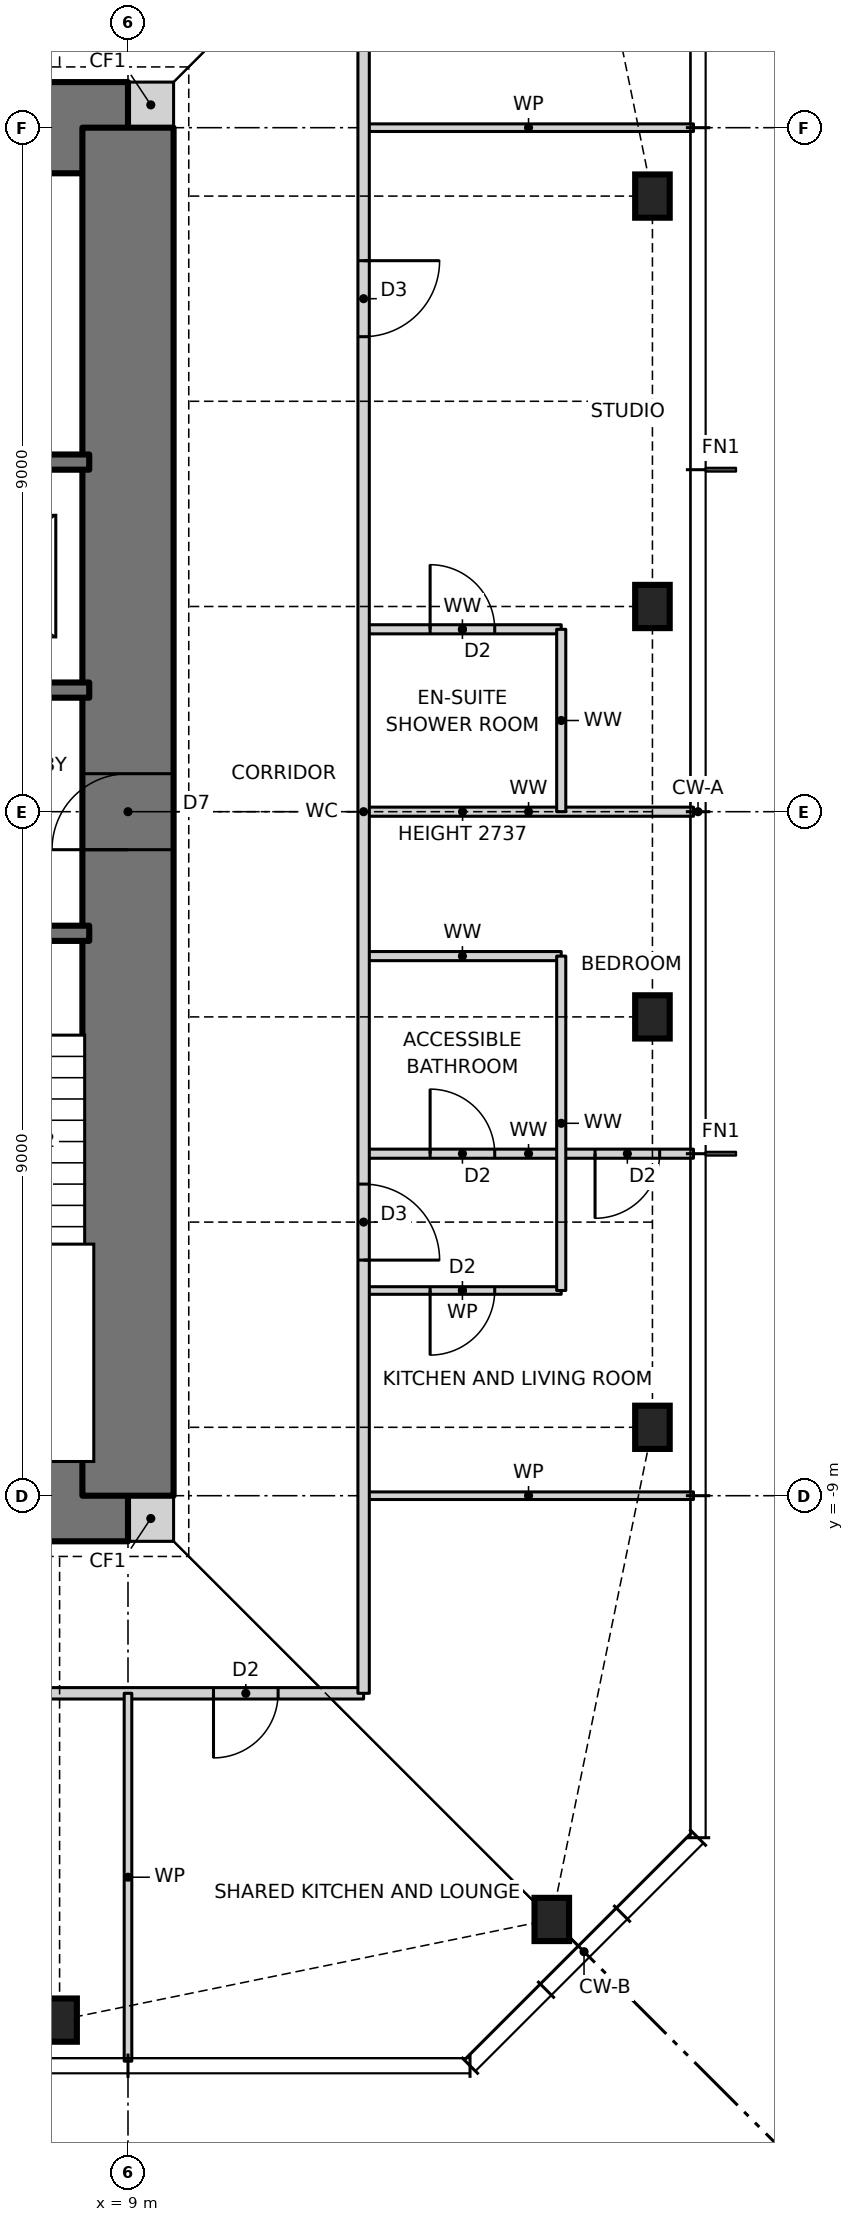
"""IFC4 building model, lengths in metres.
Left out: names, types, materials, properties, quantities, classifications, styles, units other than length and angle.
Written with IfcOpenShell. Run it as: python <this file> out.ifc"""

import sys

from ifc_helpers import new_model, si_unit, direction, frame, frame_2d, origin, origin_2d, place, context, subcontext, project, spatial, rectangle, i_section, extrude, element, fill, save


model = new_model("IFC4")
c1 = context("Model", 3, precision=1e-05, world=origin(), true_north=direction((0.0, 1.0)))
c2 = subcontext(c1, "Body", "Model", "MODEL_VIEW")
j1 = project(units=[si_unit("LENGTHUNIT", "METRE"), si_unit("PLANEANGLEUNIT", "RADIAN")], contexts=[c1])
p1 = place(None, origin())
s1 = spatial("IfcSite", under=j1, at=p1, CompositionType="ELEMENT")
p2 = place(p1, origin())
s2 = spatial("IfcBuilding", under=s1, at=p2, CompositionType="ELEMENT")
p3 = place(p2, frame((0.0, 0.0, 253.5)))
s3 = spatial("IfcBuildingStorey", under=s2, at=p3, CompositionType="ELEMENT", Elevation=253.5)
for number, where, z_axis, x_axis in (
    (1, (8.1, -15.9, 0.0), (0.0, 0.0, 1.0), (1.0, 0.0, 0.0)),
    (2, (14.576, -14.576, 0.0), (0.0, 0.0, 1.0), (1.0, 0.0, 0.0)),
    (3, (15.9, -8.1, 0.0), (0.0, 0.0, 1.0), (1.0, 0.0, 0.0)),
    (4, (15.9, -2.7, 0.0), (0.0, 0.0, 1.0), (1.0, 0.0, 0.0)),
    (5, (15.9, 2.7, 0.0), (0.0, 0.0, 1.0), (1.0, 0.0, 0.0)),
    (6, (15.9, 8.1, 0.0), (0.0, 0.0, 1.0), (1.0, 0.0, 0.0)),
):
    element("IfcColumn", number, at=place(p3, frame(where, z_axis=z_axis, x_axis=x_axis)), inside=s3, PredefinedType="COLUMN", context=c2, shape_type="SweptSolid", body=[
        extrude(i_section(OverallWidth=0.455, OverallDepth=0.569, WebThickness=0.078, FlangeThickness=0.125, at=origin_2d()), origin(), (0.0, 0.0, 1.0), 3.5),
    ])
for number, where, z_axis, x_axis in (
    (7, (9.0, -9.3, 0.0), (0.0, 0.0, 1.0), (1.0, 0.0, 0.0)),
    (8, (9.0, 9.3, 0.0), (0.0, 0.0, 1.0), (1.0, 0.0, 0.0)),
):
    element("IfcWall", number, at=place(p3, frame(where, z_axis=z_axis, x_axis=x_axis)), inside=s3, PredefinedType="SOLIDWALL", context=c2, shape_type="SweptSolid", body=[
        extrude(rectangle(XDim=0.6, YDim=0.6, at=frame_2d((0.3, 0.0))), origin(), (0.0, 0.0, 1.0), 3.5),
    ])
p4 = place(p3, frame((-9.0, -9.0, 0.0), z_axis=(0.0, 0.0, 1.0), x_axis=(1.0, 0.0, 0.0)))
e9 = element("IfcWall", 9, at=p4, inside=s3, PredefinedType="SHEAR", context=c2, shape_type="SweptSolid", body=[
    extrude(rectangle(XDim=18.0, YDim=1.2, at=frame_2d((9.0, 0.0))), origin(), (0.0, 0.0, 1.0), 3.5),
])
p5 = place(p4, frame((3.775, 0.0, 0.0)))
e10 = element("IfcOpeningElement", 10, at=p5, cuts=e9, PredefinedType="OPENING", context=c2, shape_type="SweptSolid", body=[
    extrude(rectangle(XDim=0.9, YDim=2.1, at=frame_2d((0.45, 1.05))), frame((0.0, 0.61, 0.0), z_axis=(0.0, -1.0, 0.0), x_axis=(1.0, 0.0, 0.0)), (0.0, 0.0, 1.0), 1.22),
])
p6 = place(p4, frame((10.625, 0.0, 0.0)))
e11 = element("IfcOpeningElement", 11, at=p6, cuts=e9, PredefinedType="OPENING", context=c2, shape_type="SweptSolid", body=[
    extrude(rectangle(XDim=0.9, YDim=2.1, at=frame_2d((0.45, 1.05))), frame((0.0, 0.61, 0.0), z_axis=(0.0, -1.0, 0.0), x_axis=(1.0, 0.0, 0.0)), (0.0, 0.0, 1.0), 1.22),
])
p7 = place(p3, frame((9.0, 9.0, 0.0), z_axis=(0.0, 0.0, 1.0), x_axis=(-1.0, 0.0, 0.0)))
e12 = element("IfcWall", 12, at=p7, inside=s3, PredefinedType="SHEAR", context=c2, shape_type="SweptSolid", body=[
    extrude(rectangle(XDim=18.0, YDim=1.2, at=frame_2d((9.0, 0.0))), origin(), (0.0, 0.0, 1.0), 3.5),
])
p8 = place(p7, frame((11.125, 0.0, 0.0)))
e13 = element("IfcOpeningElement", 13, at=p8, cuts=e12, PredefinedType="OPENING", context=c2, shape_type="SweptSolid", body=[
    extrude(rectangle(XDim=0.9, YDim=2.1, at=frame_2d((0.45, 1.05))), frame((0.0, 0.61, 0.0), z_axis=(0.0, -1.0, 0.0), x_axis=(1.0, 0.0, 0.0)), (0.0, 0.0, 1.0), 1.22),
])
p9 = place(p7, frame((4.275, 0.0, 0.0)))
e14 = element("IfcOpeningElement", 14, at=p9, cuts=e12, PredefinedType="OPENING", context=c2, shape_type="SweptSolid", body=[
    extrude(rectangle(XDim=0.9, YDim=2.1, at=frame_2d((0.45, 1.05))), frame((0.0, 0.61, 0.0), z_axis=(0.0, -1.0, 0.0), x_axis=(1.0, 0.0, 0.0)), (0.0, 0.0, 1.0), 1.22),
])
p10 = place(p3, frame((9.0, -9.0, 0.0), z_axis=(0.0, 0.0, 1.0), x_axis=(0.0, 1.0, 0.0)))
e15 = element("IfcWall", 15, at=p10, inside=s3, PredefinedType="SHEAR", context=c2, shape_type="SweptSolid", body=[
    extrude(rectangle(XDim=18.0, YDim=1.2, at=frame_2d((9.0, 0.0))), origin(), (0.0, 0.0, 1.0), 3.5),
])
p11 = place(p10, frame((8.5, 0.0, 0.0)))
e16 = element("IfcOpeningElement", 16, at=p11, cuts=e15, PredefinedType="OPENING", context=c2, shape_type="SweptSolid", body=[
    extrude(rectangle(XDim=1.0, YDim=2.1, at=frame_2d((0.5, 1.05))), frame((0.0, 0.61, 0.0), z_axis=(0.0, -1.0, 0.0), x_axis=(1.0, 0.0, 0.0)), (0.0, 0.0, 1.0), 1.22),
])
p12 = place(p3, frame((-11.6, -11.6, 0.0), z_axis=(0.0, 0.0, 1.0), x_axis=(1.0, 0.0, 0.0)))
e17 = element("IfcWall", 17, at=p12, inside=s3, PredefinedType="PARTITIONING", context=c2, shape_type="SweptSolid", body=[
    extrude(rectangle(XDim=23.7, YDim=0.15, at=frame_2d((11.85, 0.0))), origin(), (0.0, 0.0, 1.0), 3.27),
])
p13 = place(p12, frame((4.35, 0.0, 0.0)))
e18 = element("IfcOpeningElement", 18, at=p13, cuts=e17, PredefinedType="OPENING", context=c2, shape_type="SweptSolid", body=[
    extrude(rectangle(XDim=1.0, YDim=2.1, at=frame_2d((0.5, 1.05))), frame((0.0, 0.085, 0.0), z_axis=(0.0, -1.0, 0.0), x_axis=(1.0, 0.0, 0.0)), (0.0, 0.0, 1.0), 0.17),
])
p14 = place(p12, frame((17.85, 0.0, 0.0)))
e19 = element("IfcOpeningElement", 19, at=p14, cuts=e17, PredefinedType="OPENING", context=c2, shape_type="SweptSolid", body=[
    extrude(rectangle(XDim=1.0, YDim=2.1, at=frame_2d((0.5, 1.05))), frame((0.0, 0.085, 0.0), z_axis=(0.0, -1.0, 0.0), x_axis=(1.0, 0.0, 0.0)), (0.0, 0.0, 1.0), 0.17),
])
p15 = place(p12, frame((21.725, 0.0, 0.0)))
e20 = element("IfcOpeningElement", 20, at=p15, cuts=e17, PredefinedType="OPENING", context=c2, shape_type="SweptSolid", body=[
    extrude(rectangle(XDim=0.85, YDim=2.1, at=frame_2d((0.425, 1.05))), frame((0.0, 0.085, 0.0), z_axis=(0.0, -1.0, 0.0), x_axis=(1.0, 0.0, 0.0)), (0.0, 0.0, 1.0), 0.17),
])
p16 = place(p3, frame((12.1, -9.0, 0.0), z_axis=(0.0, 0.0, 1.0), x_axis=(1.0, 0.0, 0.0)))
e21 = element("IfcWall", 21, at=p16, inside=s3, PredefinedType="PARTITIONING", context=c2, shape_type="SweptSolid", body=[
    extrude(rectangle(XDim=4.34, YDim=0.1, at=frame_2d((2.17, 0.0))), origin(), (0.0, 0.0, 1.0), 3.27),
])
p17 = place(p3, frame((12.1, -6.3, 0.0), z_axis=(0.0, 0.0, 1.0), x_axis=(1.0, 0.0, 0.0)))
e22 = element("IfcWall", 22, at=p17, inside=s3, PredefinedType="PARTITIONING", context=c2, shape_type="SweptSolid", body=[
    extrude(rectangle(XDim=2.6, YDim=0.1, at=frame_2d((1.3, 0.0))), origin(), (0.0, 0.0, 1.0), 3.27),
])
p18 = place(p17, frame((0.875, 0.0, 0.0)))
e23 = element("IfcOpeningElement", 23, at=p18, cuts=e22, PredefinedType="OPENING", context=c2, shape_type="SweptSolid", body=[
    extrude(rectangle(XDim=0.85, YDim=2.1, at=frame_2d((0.425, 1.05))), frame((0.0, 0.06, 0.0), z_axis=(0.0, -1.0, 0.0), x_axis=(1.0, 0.0, 0.0)), (0.0, 0.0, 1.0), 0.12),
])
p19 = place(p3, frame((12.1, -4.5, 0.0), z_axis=(0.0, 0.0, 1.0), x_axis=(1.0, 0.0, 0.0)))
e24 = element("IfcWall", 24, at=p19, inside=s3, PredefinedType="PARTITIONING", context=c2, shape_type="SweptSolid", body=[
    extrude(rectangle(XDim=4.34, YDim=0.12, at=frame_2d((2.17, 0.0))), origin(), (0.0, 0.0, 1.0), 3.27),
])
p20 = place(p19, frame((3.045, 0.0, 0.0)))
e25 = element("IfcOpeningElement", 25, at=p20, cuts=e24, PredefinedType="OPENING", context=c2, shape_type="SweptSolid", body=[
    extrude(rectangle(XDim=0.85, YDim=2.1, at=frame_2d((0.425, 1.05))), frame((0.0, 0.07, 0.0), z_axis=(0.0, -1.0, 0.0), x_axis=(1.0, 0.0, 0.0)), (0.0, 0.0, 1.0), 0.14),
])
p21 = place(p19, frame((0.875, 0.0, 0.0)))
e26 = element("IfcOpeningElement", 26, at=p21, cuts=e24, PredefinedType="OPENING", context=c2, shape_type="SweptSolid", body=[
    extrude(rectangle(XDim=0.85, YDim=2.1, at=frame_2d((0.425, 1.05))), frame((0.0, 0.07, 0.0), z_axis=(0.0, -1.0, 0.0), x_axis=(1.0, 0.0, 0.0)), (0.0, 0.0, 1.0), 0.14),
])
p22 = place(p3, frame((12.1, -1.9, 0.0), z_axis=(0.0, 0.0, 1.0), x_axis=(1.0, 0.0, 0.0)))
e27 = element("IfcWall", 27, at=p22, inside=s3, PredefinedType="PARTITIONING", context=c2, shape_type="SweptSolid", body=[
    extrude(rectangle(XDim=2.6, YDim=0.12, at=frame_2d((1.3, 0.0))), origin(), (0.0, 0.0, 1.0), 3.27),
])
p23 = place(p3, frame((-8.49, -1.6, 0.0), z_axis=(0.0, 0.0, 1.0), x_axis=(1.0, 0.0, 0.0)))
e28 = element("IfcWall", 28, at=p23, inside=s3, PredefinedType="SOLIDWALL", context=c2, shape_type="SweptSolid", body=[
    extrude(rectangle(XDim=16.98, YDim=0.2, at=frame_2d((8.49, 0.0))), origin(), (0.0, 0.0, 1.0), 3.5),
])
p24 = place(p23, frame((14.81, 0.0, 0.0)))
e29 = element("IfcOpeningElement", 29, at=p24, cuts=e28, PredefinedType="OPENING", context=c2, shape_type="SweptSolid", body=[
    extrude(rectangle(XDim=1.0, YDim=2.1, at=frame_2d((0.5, 1.05))), frame((0.0, 0.11, 0.0), z_axis=(0.0, -1.0, 0.0), x_axis=(1.0, 0.0, 0.0)), (0.0, 0.0, 1.0), 0.22),
])
p25 = place(p23, frame((1.232, 0.0, 0.0)))
e30 = element("IfcOpeningElement", 30, at=p25, cuts=e28, PredefinedType="OPENING", context=c2, shape_type="SweptSolid", body=[
    extrude(rectangle(XDim=0.9, YDim=2.1, at=frame_2d((0.45, 1.05))), frame((0.0, 0.11, 0.0), z_axis=(0.0, -1.0, 0.0), x_axis=(1.0, 0.0, 0.0)), (0.0, 0.0, 1.0), 0.22),
])
p26 = place(p23, frame((4.627, 0.0, 0.0)))
e31 = element("IfcOpeningElement", 31, at=p26, cuts=e28, PredefinedType="OPENING", context=c2, shape_type="SweptSolid", body=[
    extrude(rectangle(XDim=0.9, YDim=2.1, at=frame_2d((0.45, 1.05))), frame((0.0, 0.11, 0.0), z_axis=(0.0, -1.0, 0.0), x_axis=(1.0, 0.0, 0.0)), (0.0, 0.0, 1.0), 0.22),
])
p27 = place(p23, frame((8.052, 0.0, 0.0)))
e32 = element("IfcOpeningElement", 32, at=p27, cuts=e28, PredefinedType="OPENING", context=c2, shape_type="SweptSolid", body=[
    extrude(rectangle(XDim=0.9, YDim=2.1, at=frame_2d((0.45, 1.05))), frame((0.0, 0.11, 0.0), z_axis=(0.0, -1.0, 0.0), x_axis=(1.0, 0.0, 0.0)), (0.0, 0.0, 1.0), 0.22),
])
p28 = place(p23, frame((11.478, 0.0, 0.0)))
e33 = element("IfcOpeningElement", 33, at=p28, cuts=e28, PredefinedType="OPENING", context=c2, shape_type="SweptSolid", body=[
    extrude(rectangle(XDim=0.9, YDim=2.1, at=frame_2d((0.45, 1.05))), frame((0.0, 0.11, 0.0), z_axis=(0.0, -1.0, 0.0), x_axis=(1.0, 0.0, 0.0)), (0.0, 0.0, 1.0), 0.22),
])
p29 = place(p3, frame((12.1, 0.0, 0.0), z_axis=(0.0, 0.0, 1.0), x_axis=(1.0, 0.0, 0.0)))
e34 = element("IfcWall", 34, at=p29, inside=s3, PredefinedType="PARTITIONING", context=c2, shape_type="SweptSolid", body=[
    extrude(rectangle(XDim=4.34, YDim=0.12, at=frame_2d((2.17, 0.0))), origin(), (0.0, 0.0, 1.0), 2.737),
])
p30 = place(p3, frame((-8.49, 1.6, 0.0), z_axis=(0.0, 0.0, 1.0), x_axis=(1.0, 0.0, 0.0)))
e35 = element("IfcWall", 35, at=p30, inside=s3, PredefinedType="SOLIDWALL", context=c2, shape_type="SweptSolid", body=[
    extrude(rectangle(XDim=16.98, YDim=0.2, at=frame_2d((8.49, 0.0))), origin(), (0.0, 0.0, 1.0), 3.5),
])
p31 = place(p30, frame((1.17, 0.0, 0.0)))
e36 = element("IfcOpeningElement", 36, at=p31, cuts=e35, PredefinedType="OPENING", context=c2, shape_type="SweptSolid", body=[
    extrude(rectangle(XDim=1.0, YDim=2.1, at=frame_2d((0.5, 1.05))), frame((0.0, 0.11, 0.0), z_axis=(0.0, -1.0, 0.0), x_axis=(1.0, 0.0, 0.0)), (0.0, 0.0, 1.0), 0.22),
])
p32 = place(p30, frame((4.606, 0.0, 0.0)))
e37 = element("IfcOpeningElement", 37, at=p32, cuts=e35, PredefinedType="OPENING", context=c2, shape_type="SweptSolid", body=[
    extrude(rectangle(XDim=0.9, YDim=2.1, at=frame_2d((0.45, 1.05))), frame((0.0, 0.11, 0.0), z_axis=(0.0, -1.0, 0.0), x_axis=(1.0, 0.0, 0.0)), (0.0, 0.0, 1.0), 0.22),
])
p33 = place(p30, frame((8.04, 0.0, 0.0)))
e38 = element("IfcOpeningElement", 38, at=p33, cuts=e35, PredefinedType="OPENING", context=c2, shape_type="SweptSolid", body=[
    extrude(rectangle(XDim=0.9, YDim=2.1, at=frame_2d((0.45, 1.05))), frame((0.0, 0.11, 0.0), z_axis=(0.0, -1.0, 0.0), x_axis=(1.0, 0.0, 0.0)), (0.0, 0.0, 1.0), 0.22),
])
p34 = place(p30, frame((11.374, 0.0, 0.0)))
e39 = element("IfcOpeningElement", 39, at=p34, cuts=e35, PredefinedType="OPENING", context=c2, shape_type="SweptSolid", body=[
    extrude(rectangle(XDim=1.1, YDim=2.1, at=frame_2d((0.55, 1.05))), frame((0.0, 0.11, 0.0), z_axis=(0.0, -1.0, 0.0), x_axis=(1.0, 0.0, 0.0)), (0.0, 0.0, 1.0), 0.22),
])
p35 = place(p30, frame((14.66, 0.0, 0.0)))
e40 = element("IfcOpeningElement", 40, at=p35, cuts=e35, PredefinedType="OPENING", context=c2, shape_type="SweptSolid", body=[
    extrude(rectangle(XDim=1.3, YDim=2.1, at=frame_2d((0.65, 1.05))), frame((0.0, 0.11, 0.0), z_axis=(0.0, -1.0, 0.0), x_axis=(1.0, 0.0, 0.0)), (0.0, 0.0, 1.0), 0.22),
])
p36 = place(p3, frame((12.1, 2.4, 0.0), z_axis=(0.0, 0.0, 1.0), x_axis=(1.0, 0.0, 0.0)))
e41 = element("IfcWall", 41, at=p36, inside=s3, PredefinedType="PARTITIONING", context=c2, shape_type="SweptSolid", body=[
    extrude(rectangle(XDim=2.6, YDim=0.12, at=frame_2d((1.3, 0.0))), origin(), (0.0, 0.0, 1.0), 3.27),
])
p37 = place(p36, frame((0.875, 0.0, 0.0)))
e42 = element("IfcOpeningElement", 42, at=p37, cuts=e41, PredefinedType="OPENING", context=c2, shape_type="SweptSolid", body=[
    extrude(rectangle(XDim=0.85, YDim=2.1, at=frame_2d((0.425, 1.05))), frame((0.0, 0.07, 0.0), z_axis=(0.0, -1.0, 0.0), x_axis=(1.0, 0.0, 0.0)), (0.0, 0.0, 1.0), 0.14),
])
p38 = place(p3, frame((5.15, 4.6, 0.0), z_axis=(0.0, 0.0, 1.0), x_axis=(1.0, 0.0, 0.0)))
e43 = element("IfcWall", 43, at=p38, inside=s3, PredefinedType="SOLIDWALL", context=c2, shape_type="SweptSolid", body=[
    extrude(rectangle(XDim=3.34, YDim=0.2, at=frame_2d((1.67, 0.0))), origin(), (0.0, 0.0, 1.0), 3.5),
])
p39 = place(p3, frame((12.1, 9.0, 0.0), z_axis=(0.0, 0.0, 1.0), x_axis=(1.0, 0.0, 0.0)))
e44 = element("IfcWall", 44, at=p39, inside=s3, PredefinedType="PARTITIONING", context=c2, shape_type="SweptSolid", body=[
    extrude(rectangle(XDim=4.34, YDim=0.1, at=frame_2d((2.17, 0.0))), origin(), (0.0, 0.0, 1.0), 3.27),
])
p40 = place(p3, frame((14.7, -6.3, 0.0), z_axis=(0.0, 0.0, 1.0), x_axis=(0.0, 1.0, 0.0)))
e45 = element("IfcWall", 45, at=p40, inside=s3, PredefinedType="PARTITIONING", context=c2, shape_type="SweptSolid", body=[
    extrude(rectangle(XDim=4.4, YDim=0.12, at=frame_2d((2.2, 0.0))), origin(), (0.0, 0.0, 1.0), 3.27),
])
p41 = place(p3, frame((14.7, 0.0, 0.0), z_axis=(0.0, 0.0, 1.0), x_axis=(0.0, 1.0, 0.0)))
e46 = element("IfcWall", 46, at=p41, inside=s3, PredefinedType="PARTITIONING", context=c2, shape_type="SweptSolid", body=[
    extrude(rectangle(XDim=2.4, YDim=0.12, at=frame_2d((1.2, 0.0))), origin(), (0.0, 0.0, 1.0), 3.27),
])
p42 = place(p3, frame((12.1, -11.6, 0.0), z_axis=(0.0, 0.0, 1.0), x_axis=(0.0, 1.0, 0.0)))
e47 = element("IfcWall", 47, at=p42, inside=s3, PredefinedType="PARTITIONING", context=c2, shape_type="SweptSolid", body=[
    extrude(rectangle(XDim=23.2, YDim=0.15, at=frame_2d((11.6, 0.0))), origin(), (0.0, 0.0, 1.0), 3.27),
])
p43 = place(p42, frame((5.7, 0.0, 0.0)))
e48 = element("IfcOpeningElement", 48, at=p43, cuts=e47, PredefinedType="OPENING", context=c2, shape_type="SweptSolid", body=[
    extrude(rectangle(XDim=1.0, YDim=2.1, at=frame_2d((0.5, 1.05))), frame((0.0, 0.085, 0.0), z_axis=(0.0, -1.0, 0.0), x_axis=(1.0, 0.0, 0.0)), (0.0, 0.0, 1.0), 0.17),
])
p44 = place(p42, frame((17.85, 0.0, 0.0)))
e49 = element("IfcOpeningElement", 49, at=p44, cuts=e47, PredefinedType="OPENING", context=c2, shape_type="SweptSolid", body=[
    extrude(rectangle(XDim=1.0, YDim=2.1, at=frame_2d((0.5, 1.05))), frame((0.0, 0.085, 0.0), z_axis=(0.0, -1.0, 0.0), x_axis=(1.0, 0.0, 0.0)), (0.0, 0.0, 1.0), 0.17),
])
p45 = place(p3, frame((9.0, -16.44, 0.0), z_axis=(0.0, 0.0, 1.0), x_axis=(0.0, 1.0, 0.0)))
e50 = element("IfcWall", 50, at=p45, inside=s3, PredefinedType="PARTITIONING", context=c2, shape_type="SweptSolid", body=[
    extrude(rectangle(XDim=4.84, YDim=0.1, at=frame_2d((2.42, 0.0))), origin(), (0.0, 0.0, 1.0), 3.27),
])
p46 = place(p43, frame((1.0, 0.0, 0.0), z_axis=(0.0, 0.0, 1.0), x_axis=(-1.0, 0.0, 0.0)))
e51 = element("IfcDoor", 51, at=p46, inside=s3, OperationType="SINGLE_SWING_RIGHT", PredefinedType="DOOR", context=c2, shape_type="SweptSolid", body=[
    extrude(rectangle(XDim=1.0, YDim=2.1, at=frame_2d((0.5, 1.05))), frame((0.0, 0.025, 0.0), z_axis=(0.0, -1.0, 0.0), x_axis=(1.0, 0.0, 0.0)), (0.0, 0.0, 1.0), 0.05),
])
fill(e48, e51)
p47 = place(p18, frame((0.85, 0.0, 0.0), z_axis=(0.0, 0.0, 1.0), x_axis=(-1.0, 0.0, 0.0)))
e52 = element("IfcDoor", 52, at=p47, inside=s3, OperationType="SINGLE_SWING_RIGHT", PredefinedType="DOOR", context=c2, shape_type="SweptSolid", body=[
    extrude(rectangle(XDim=0.85, YDim=2.1, at=frame_2d((0.425, 1.05))), frame((0.0, 0.025, 0.0), z_axis=(0.0, -1.0, 0.0), x_axis=(1.0, 0.0, 0.0)), (0.0, 0.0, 1.0), 0.05),
])
fill(e23, e52)
p48 = place(p20, frame((0.85, 0.0, 0.0), z_axis=(0.0, 0.0, 1.0), x_axis=(-1.0, 0.0, 0.0)))
e53 = element("IfcDoor", 53, at=p48, inside=s3, OperationType="SINGLE_SWING_RIGHT", PredefinedType="DOOR", context=c2, shape_type="SweptSolid", body=[
    extrude(rectangle(XDim=0.85, YDim=2.1, at=frame_2d((0.425, 1.05))), frame((0.0, 0.025, 0.0), z_axis=(0.0, -1.0, 0.0), x_axis=(1.0, 0.0, 0.0)), (0.0, 0.0, 1.0), 0.05),
])
fill(e25, e53)
p49 = place(p21, origin())
e54 = element("IfcDoor", 54, at=p49, inside=s3, OperationType="SINGLE_SWING_LEFT", PredefinedType="DOOR", context=c2, shape_type="SweptSolid", body=[
    extrude(rectangle(XDim=0.85, YDim=2.1, at=frame_2d((0.425, 1.05))), frame((0.0, 0.025, 0.0), z_axis=(0.0, -1.0, 0.0), x_axis=(1.0, 0.0, 0.0)), (0.0, 0.0, 1.0), 0.05),
])
fill(e26, e54)
p50 = place(p44, frame((1.0, 0.0, 0.0), z_axis=(0.0, 0.0, 1.0), x_axis=(-1.0, 0.0, 0.0)))
e55 = element("IfcDoor", 55, at=p50, inside=s3, OperationType="SINGLE_SWING_LEFT", PredefinedType="DOOR", context=c2, shape_type="SweptSolid", body=[
    extrude(rectangle(XDim=1.0, YDim=2.1, at=frame_2d((0.5, 1.05))), frame((0.0, 0.025, 0.0), z_axis=(0.0, -1.0, 0.0), x_axis=(1.0, 0.0, 0.0)), (0.0, 0.0, 1.0), 0.05),
])
fill(e49, e55)
p51 = place(p37, origin())
e56 = element("IfcDoor", 56, at=p51, inside=s3, OperationType="SINGLE_SWING_LEFT", PredefinedType="DOOR", context=c2, shape_type="SweptSolid", body=[
    extrude(rectangle(XDim=0.85, YDim=2.1, at=frame_2d((0.425, 1.05))), frame((0.0, 0.025, 0.0), z_axis=(0.0, -1.0, 0.0), x_axis=(1.0, 0.0, 0.0)), (0.0, 0.0, 1.0), 0.05),
])
fill(e42, e56)
p52 = place(p15, frame((0.85, 0.0, 0.0), z_axis=(0.0, 0.0, 1.0), x_axis=(-1.0, 0.0, 0.0)))
e57 = element("IfcDoor", 57, at=p52, inside=s3, OperationType="SINGLE_SWING_RIGHT", PredefinedType="DOOR", context=c2, shape_type="SweptSolid", body=[
    extrude(rectangle(XDim=0.85, YDim=2.1, at=frame_2d((0.425, 1.05))), frame((0.0, 0.025, 0.0), z_axis=(0.0, -1.0, 0.0), x_axis=(1.0, 0.0, 0.0)), (0.0, 0.0, 1.0), 0.05),
])
fill(e20, e57)
p53 = place(p11, origin())
e58 = element("IfcDoor", 58, at=p53, inside=s3, OperationType="SINGLE_SWING_LEFT", PredefinedType="DOOR", context=c2, shape_type="SweptSolid", body=[
    extrude(rectangle(XDim=1.0, YDim=2.1, at=frame_2d((0.5, 1.05))), frame((0.0, 0.025, 0.0), z_axis=(0.0, -1.0, 0.0), x_axis=(1.0, 0.0, 0.0)), (0.0, 0.0, 1.0), 0.05),
])
fill(e16, e58)
save(model, sys.argv[1])
